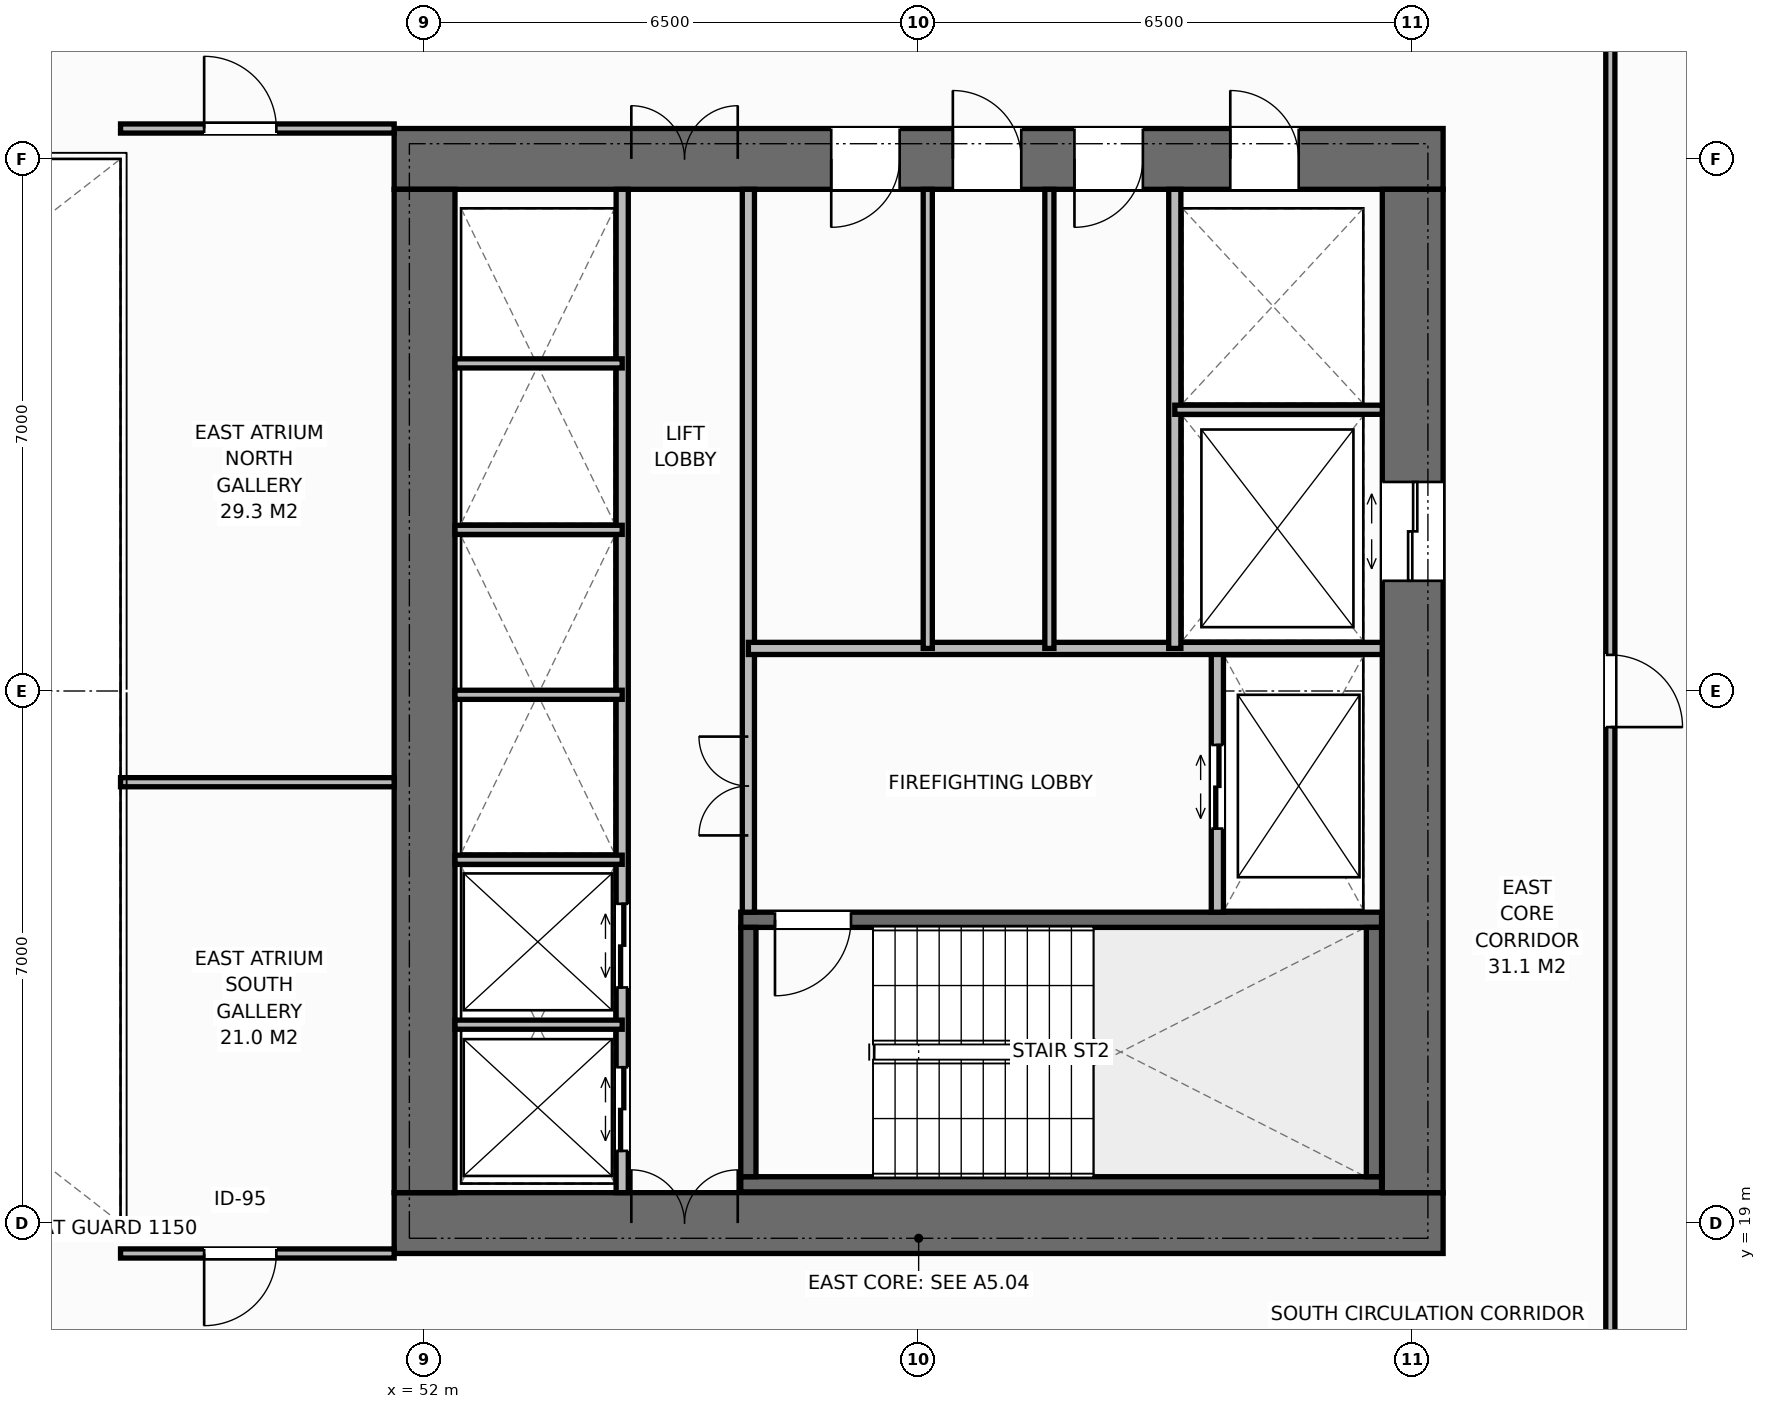
"""IFC4 building model, lengths in metres.
Left out: names, types, materials, properties, quantities, classifications, styles, units other than length and angle.
Written with IfcOpenShell. Run it as: python <this file> out.ifc"""

import sys

from ifc_helpers import new_model, si_unit, direction, frame, frame_2d, origin, place, context, subcontext, project, spatial, rectangle, extrude, element, fill, save


model = new_model("IFC4")
c1 = context("Model", 3, precision=1e-05, world=origin(), true_north=direction((0.0, 1.0)))
c2 = subcontext(c1, "Body", "Model", "MODEL_VIEW")
j1 = project(units=[si_unit("LENGTHUNIT", "METRE"), si_unit("PLANEANGLEUNIT", "RADIAN")], contexts=[c1])
p1 = place(None, origin())
s1 = spatial("IfcSite", under=j1, at=p1, CompositionType="ELEMENT")
p2 = place(p1, origin())
s2 = spatial("IfcBuilding", under=s1, at=p2, CompositionType="ELEMENT")
p3 = place(p2, frame((0.0, 0.0, 43.0)))
s3 = spatial("IfcBuildingStorey", under=s2, at=p3, CompositionType="ELEMENT", Elevation=43.0)
p4 = place(p3, frame((51.6, 19.0, 0.0), z_axis=(0.0, 0.0, 1.0), x_axis=(1.0, 0.0, 0.0)))
e1 = element("IfcWall", 1, at=p4, inside=s3, PredefinedType="SHEAR", context=c2, shape_type="SweptSolid", body=[
    extrude(rectangle(XDim=13.8, YDim=0.8, at=frame_2d((6.9, 0.0))), origin(), (0.0, 0.0, 1.0), 3.8),
])
p5 = place(p4, frame((3.12, 0.0, 0.0)))
e2 = element("IfcOpeningElement", 2, at=p5, cuts=e1, PredefinedType="OPENING", context=c2, shape_type="SweptSolid", body=[
    extrude(rectangle(XDim=1.4, YDim=2.2, at=frame_2d((0.7, 1.1))), frame((0.0, 0.41, 0.0), z_axis=(0.0, -1.0, 0.0), x_axis=(1.0, 0.0, 0.0)), (0.0, 0.0, 1.0), 0.82),
])
p6 = place(p3, frame((51.6, 33.0, 0.0), z_axis=(0.0, 0.0, 1.0), x_axis=(1.0, 0.0, 0.0)))
e3 = element("IfcWall", 3, at=p6, inside=s3, PredefinedType="SHEAR", context=c2, shape_type="SweptSolid", body=[
    extrude(rectangle(XDim=13.8, YDim=0.8, at=frame_2d((6.9, 0.0))), origin(), (0.0, 0.0, 1.0), 3.8),
])
p7 = place(p6, frame((3.12, 0.0, 0.0)))
e4 = element("IfcOpeningElement", 4, at=p7, cuts=e3, PredefinedType="OPENING", context=c2, shape_type="SweptSolid", body=[
    extrude(rectangle(XDim=1.4, YDim=2.2, at=frame_2d((0.7, 1.1))), frame((0.0, 0.41, 0.0), z_axis=(0.0, -1.0, 0.0), x_axis=(1.0, 0.0, 0.0)), (0.0, 0.0, 1.0), 0.82),
])
p8 = place(p6, frame((11.0, 0.0, 0.0)))
e5 = element("IfcOpeningElement", 5, at=p8, cuts=e3, PredefinedType="OPENING", context=c2, shape_type="SweptSolid", body=[
    extrude(rectangle(XDim=0.9, YDim=2.15, at=frame_2d((0.45, 1.075))), frame((0.0, 0.41, 0.0), z_axis=(0.0, -1.0, 0.0), x_axis=(1.0, 0.0, 0.0)), (0.0, 0.0, 1.0), 0.82),
])
p9 = place(p6, frame((5.75, 0.0, 0.0)))
e6 = element("IfcOpeningElement", 6, at=p9, cuts=e3, PredefinedType="OPENING", context=c2, shape_type="SweptSolid", body=[
    extrude(rectangle(XDim=0.9, YDim=2.15, at=frame_2d((0.45, 1.075))), frame((0.0, 0.41, 0.0), z_axis=(0.0, -1.0, 0.0), x_axis=(1.0, 0.0, 0.0)), (0.0, 0.0, 1.0), 0.82),
])
p10 = place(p6, frame((7.35, 0.0, 0.0)))
e7 = element("IfcOpeningElement", 7, at=p10, cuts=e3, PredefinedType="OPENING", context=c2, shape_type="SweptSolid", body=[
    extrude(rectangle(XDim=0.9, YDim=2.15, at=frame_2d((0.45, 1.075))), frame((0.0, 0.41, 0.0), z_axis=(0.0, -1.0, 0.0), x_axis=(1.0, 0.0, 0.0)), (0.0, 0.0, 1.0), 0.82),
])
p11 = place(p6, frame((8.95, 0.0, 0.0)))
e8 = element("IfcOpeningElement", 8, at=p11, cuts=e3, PredefinedType="OPENING", context=c2, shape_type="SweptSolid", body=[
    extrude(rectangle(XDim=0.9, YDim=2.15, at=frame_2d((0.45, 1.075))), frame((0.0, 0.41, 0.0), z_axis=(0.0, -1.0, 0.0), x_axis=(1.0, 0.0, 0.0)), (0.0, 0.0, 1.0), 0.82),
])
p12 = place(p3, frame((52.0, 19.4, 0.0), z_axis=(0.0, 0.0, 1.0), x_axis=(0.0, 1.0, 0.0)))
e9 = element("IfcWall", 9, at=p12, inside=s3, PredefinedType="SHEAR", context=c2, shape_type="SweptSolid", body=[
    extrude(rectangle(XDim=13.2, YDim=0.8, at=frame_2d((6.6, 0.0))), origin(), (0.0, 0.0, 1.0), 3.8),
])
p13 = place(p3, frame((65.0, 19.4, 0.0), z_axis=(0.0, 0.0, 1.0), x_axis=(0.0, 1.0, 0.0)))
e10 = element("IfcWall", 10, at=p13, inside=s3, PredefinedType="SHEAR", context=c2, shape_type="SweptSolid", body=[
    extrude(rectangle(XDim=13.2, YDim=0.8, at=frame_2d((6.6, 0.0))), origin(), (0.0, 0.0, 1.0), 3.8),
])
p14 = place(p13, frame((8.05, 0.0, 0.0)))
e11 = element("IfcOpeningElement", 11, at=p14, cuts=e10, PredefinedType="OPENING", context=c2, shape_type="SweptSolid", body=[
    extrude(rectangle(XDim=1.3, YDim=2.2, at=frame_2d((0.65, 1.1))), frame((0.0, 0.41, 0.0), z_axis=(0.0, -1.0, 0.0), x_axis=(1.0, 0.0, 0.0)), (0.0, 0.0, 1.0), 0.82),
])
p15 = place(p3, frame((56.16, 19.51, 0.0), z_axis=(0.0, 0.0, 1.0), x_axis=(1.0, 0.0, 0.0)))
e12 = element("IfcWall", 12, at=p15, inside=s3, PredefinedType="SHEAR", context=c2, shape_type="SweptSolid", body=[
    extrude(rectangle(XDim=8.43, YDim=0.2, at=frame_2d((4.215, 0.0))), origin(), (0.0, 0.0, 1.0), 3.8),
])
p16 = place(p3, frame((56.16, 22.99, 0.0), z_axis=(0.0, 0.0, 1.0), x_axis=(1.0, 0.0, 0.0)))
e13 = element("IfcWall", 13, at=p16, inside=s3, PredefinedType="SHEAR", context=c2, shape_type="SweptSolid", body=[
    extrude(rectangle(XDim=8.43, YDim=0.2, at=frame_2d((4.215, 0.0))), origin(), (0.0, 0.0, 1.0), 3.8),
])
p17 = place(p16, frame((0.45, 0.0, 0.0)))
e14 = element("IfcOpeningElement", 14, at=p17, cuts=e13, PredefinedType="OPENING", context=c2, shape_type="SweptSolid", body=[
    extrude(rectangle(XDim=1.0, YDim=2.15, at=frame_2d((0.5, 1.075))), frame((0.0, 0.11, 0.0), z_axis=(0.0, -1.0, 0.0), x_axis=(1.0, 0.0, 0.0)), (0.0, 0.0, 1.0), 0.22),
])
for number, where, z_axis, x_axis in (
    (15, (56.26, 19.61, 0.0), (0.0, 0.0, 1.0), (0.0, 1.0, 0.0)),
    (16, (64.49, 19.61, 0.0), (0.0, 0.0, 1.0), (0.0, 1.0, 0.0)),
):
    element("IfcWall", number, at=place(p3, frame(where, z_axis=z_axis, x_axis=x_axis)), inside=s3, PredefinedType="SHEAR", context=c2, shape_type="SweptSolid", body=[
        extrude(rectangle(XDim=3.28, YDim=0.2, at=frame_2d((1.64, 0.0))), origin(), (0.0, 0.0, 1.0), 3.8),
    ])
p18 = place(p3, frame((54.6, 19.4, 0.0), z_axis=(0.0, 0.0, 1.0), x_axis=(0.0, 1.0, 0.0)))
e17 = element("IfcWall", 17, at=p18, inside=s3, PredefinedType="STANDARD", context=c2, shape_type="SweptSolid", body=[
    extrude(rectangle(XDim=13.2, YDim=0.16, at=frame_2d((6.6, 0.0))), origin(), (0.0, 0.0, 1.0), 3.55),
])
p19 = place(p18, frame((0.55, 0.0, 0.0)))
e18 = element("IfcOpeningElement", 18, at=p19, cuts=e17, PredefinedType="OPENING", context=c2, shape_type="SweptSolid", body=[
    extrude(rectangle(XDim=1.1, YDim=2.2, at=frame_2d((0.55, 1.1))), frame((0.0, 0.09, 0.0), z_axis=(0.0, -1.0, 0.0), x_axis=(1.0, 0.0, 0.0)), (0.0, 0.0, 1.0), 0.18),
])
p20 = place(p18, frame((2.7, 0.0, 0.0)))
e19 = element("IfcOpeningElement", 19, at=p20, cuts=e17, PredefinedType="OPENING", context=c2, shape_type="SweptSolid", body=[
    extrude(rectangle(XDim=1.1, YDim=2.2, at=frame_2d((0.55, 1.1))), frame((0.0, 0.09, 0.0), z_axis=(0.0, -1.0, 0.0), x_axis=(1.0, 0.0, 0.0)), (0.0, 0.0, 1.0), 0.18),
])
p21 = place(p3, frame((56.26, 23.09, 0.0), z_axis=(0.0, 0.0, 1.0), x_axis=(0.0, 1.0, 0.0)))
e20 = element("IfcWall", 20, at=p21, inside=s3, PredefinedType="STANDARD", context=c2, shape_type="SweptSolid", body=[
    extrude(rectangle(XDim=9.51, YDim=0.16, at=frame_2d((4.755, 0.0))), origin(), (0.0, 0.0, 1.0), 3.55),
])
p22 = place(p21, frame((1.01, 0.0, 0.0)))
e21 = element("IfcOpeningElement", 21, at=p22, cuts=e20, PredefinedType="OPENING", context=c2, shape_type="SweptSolid", body=[
    extrude(rectangle(XDim=1.3, YDim=2.2, at=frame_2d((0.65, 1.1))), frame((0.0, 0.09, 0.0), z_axis=(0.0, -1.0, 0.0), x_axis=(1.0, 0.0, 0.0)), (0.0, 0.0, 1.0), 0.18),
])
for number, where, z_axis, x_axis in (
    (22, (52.4, 21.61, 0.0), (0.0, 0.0, 1.0), (1.0, 0.0, 0.0)),
    (23, (52.4, 23.78, 0.0), (0.0, 0.0, 1.0), (1.0, 0.0, 0.0)),
    (24, (52.4, 25.95, 0.0), (0.0, 0.0, 1.0), (1.0, 0.0, 0.0)),
    (25, (52.4, 28.12, 0.0), (0.0, 0.0, 1.0), (1.0, 0.0, 0.0)),
    (26, (52.4, 30.31, 0.0), (0.0, 0.0, 1.0), (1.0, 0.0, 0.0)),
):
    element("IfcWall", number, at=place(p3, frame(where, z_axis=z_axis, x_axis=x_axis)), inside=s3, PredefinedType="PARTITIONING", context=c2, shape_type="SweptSolid", body=[
        extrude(rectangle(XDim=2.2, YDim=0.12, at=frame_2d((1.1, 0.0))), origin(), (0.0, 0.0, 1.0), 3.55),
    ])
p23 = place(p3, frame((62.43, 23.09, 0.0), z_axis=(0.0, 0.0, 1.0), x_axis=(0.0, 1.0, 0.0)))
e27 = element("IfcWall", 27, at=p23, inside=s3, PredefinedType="STANDARD", context=c2, shape_type="SweptSolid", body=[
    extrude(rectangle(XDim=3.47, YDim=0.16, at=frame_2d((1.735, 0.0))), origin(), (0.0, 0.0, 1.0), 3.55),
])
p24 = place(p23, frame((1.1, 0.0, 0.0)))
e28 = element("IfcOpeningElement", 28, at=p24, cuts=e27, PredefinedType="OPENING", context=c2, shape_type="SweptSolid", body=[
    extrude(rectangle(XDim=1.1, YDim=2.2, at=frame_2d((0.55, 1.1))), frame((0.0, 0.09, 0.0), z_axis=(0.0, -1.0, 0.0), x_axis=(1.0, 0.0, 0.0)), (0.0, 0.0, 1.0), 0.18),
])
p25 = place(p3, frame((56.26, 26.56, 0.0), z_axis=(0.0, 0.0, 1.0), x_axis=(1.0, 0.0, 0.0)))
e29 = element("IfcWall", 29, at=p25, inside=s3, PredefinedType="STANDARD", context=c2, shape_type="SweptSolid", body=[
    extrude(rectangle(XDim=8.34, YDim=0.16, at=frame_2d((4.17, 0.0))), origin(), (0.0, 0.0, 1.0), 3.55),
])
p26 = place(p3, frame((61.87, 26.56, 0.0), z_axis=(0.0, 0.0, 1.0), x_axis=(0.0, 1.0, 0.0)))
e30 = element("IfcWall", 30, at=p26, inside=s3, PredefinedType="STANDARD", context=c2, shape_type="SweptSolid", body=[
    extrude(rectangle(XDim=6.04, YDim=0.16, at=frame_2d((3.02, 0.0))), origin(), (0.0, 0.0, 1.0), 3.55),
])
p27 = place(p3, frame((61.87, 29.7, 0.0), z_axis=(0.0, 0.0, 1.0), x_axis=(1.0, 0.0, 0.0)))
e31 = element("IfcWall", 31, at=p27, inside=s3, PredefinedType="PARTITIONING", context=c2, shape_type="SweptSolid", body=[
    extrude(rectangle(XDim=2.73, YDim=0.12, at=frame_2d((1.365, 0.0))), origin(), (0.0, 0.0, 1.0), 3.55),
])
for number, where, z_axis, x_axis in (
    (32, (58.62, 26.56, 0.0), (0.0, 0.0, 1.0), (0.0, 1.0, 0.0)),
    (33, (60.22, 26.56, 0.0), (0.0, 0.0, 1.0), (0.0, 1.0, 0.0)),
):
    element("IfcWall", number, at=place(p3, frame(where, z_axis=z_axis, x_axis=x_axis)), inside=s3, PredefinedType="PARTITIONING", context=c2, shape_type="SweptSolid", body=[
        extrude(rectangle(XDim=6.04, YDim=0.12, at=frame_2d((3.02, 0.0))), origin(), (0.0, 0.0, 1.0), 3.55),
    ])
p28 = place(p3, frame((48.0, 24.8, 0.0), z_axis=(0.0, 0.0, 1.0), x_axis=(1.0, 0.0, 0.0)))
e34 = element("IfcWall", 34, at=p28, inside=s3, PredefinedType="PARTITIONING", context=c2, shape_type="SweptSolid", body=[
    extrude(rectangle(XDim=3.6, YDim=0.12, at=frame_2d((1.8, 0.0))), origin(), (0.0, 0.0, 1.0), 3.55),
])
p29 = place(p3, frame((48.0, 18.6, 0.0), z_axis=(0.0, 0.0, 1.0), x_axis=(1.0, 0.0, 0.0)))
e35 = element("IfcWall", 35, at=p29, inside=s3, PredefinedType="PARTITIONING", context=c2, shape_type="SweptSolid", body=[
    extrude(rectangle(XDim=3.6, YDim=0.12, at=frame_2d((1.8, 0.0))), origin(), (0.0, 0.0, 1.0), 3.55),
])
p30 = place(p29, frame((1.1, 0.0, 0.0)))
e36 = element("IfcOpeningElement", 36, at=p30, cuts=e35, PredefinedType="OPENING", context=c2, shape_type="SweptSolid", body=[
    extrude(rectangle(XDim=0.95, YDim=2.15, at=frame_2d((0.475, 1.075))), frame((0.0, 0.07, 0.0), z_axis=(0.0, -1.0, 0.0), x_axis=(1.0, 0.0, 0.0)), (0.0, 0.0, 1.0), 0.14),
])
p31 = place(p3, frame((48.0, 33.4, 0.0), z_axis=(0.0, 0.0, 1.0), x_axis=(1.0, 0.0, 0.0)))
e37 = element("IfcWall", 37, at=p31, inside=s3, PredefinedType="PARTITIONING", context=c2, shape_type="SweptSolid", body=[
    extrude(rectangle(XDim=3.6, YDim=0.12, at=frame_2d((1.8, 0.0))), origin(), (0.0, 0.0, 1.0), 3.55),
])
p32 = place(p31, frame((1.1, 0.0, 0.0)))
e38 = element("IfcOpeningElement", 38, at=p32, cuts=e37, PredefinedType="OPENING", context=c2, shape_type="SweptSolid", body=[
    extrude(rectangle(XDim=0.95, YDim=2.15, at=frame_2d((0.475, 1.075))), frame((0.0, 0.07, 0.0), z_axis=(0.0, -1.0, 0.0), x_axis=(1.0, 0.0, 0.0)), (0.0, 0.0, 1.0), 0.14),
])
p33 = place(p3, frame((67.6, 16.5, 0.0), z_axis=(0.0, 0.0, 1.0), x_axis=(0.0, 1.0, 0.0)))
e39 = element("IfcWall", 39, at=p33, inside=s3, PredefinedType="PARTITIONING", context=c2, shape_type="SweptSolid", body=[
    extrude(rectangle(XDim=19.0, YDim=0.12, at=frame_2d((9.5, 0.0))), origin(), (0.0, 0.0, 1.0), 3.55),
])
p34 = place(p33, frame((9.025, 0.0, 0.0)))
e40 = element("IfcOpeningElement", 40, at=p34, cuts=e39, PredefinedType="OPENING", context=c2, shape_type="SweptSolid", body=[
    extrude(rectangle(XDim=0.95, YDim=2.15, at=frame_2d((0.475, 1.075))), frame((0.0, 0.07, 0.0), z_axis=(0.0, -1.0, 0.0), x_axis=(1.0, 0.0, 0.0)), (0.0, 0.0, 1.0), 0.14),
])
p35 = place(p5, origin())
e41 = element("IfcDoor", 41, at=p35, inside=s3, OperationType="DOUBLE_DOOR_SINGLE_SWING", PredefinedType="DOOR", context=c2, shape_type="SweptSolid", body=[
    extrude(rectangle(XDim=1.4, YDim=2.2, at=frame_2d((0.7, 1.1))), frame((0.0, 0.125, 0.0), z_axis=(0.0, -1.0, 0.0), x_axis=(1.0, 0.0, 0.0)), (0.0, 0.0, 1.0), 0.05),
])
fill(e2, e41)
p36 = place(p7, origin())
e42 = element("IfcDoor", 42, at=p36, inside=s3, OperationType="DOUBLE_DOOR_SINGLE_SWING", PredefinedType="DOOR", context=c2, shape_type="SweptSolid", body=[
    extrude(rectangle(XDim=1.4, YDim=2.2, at=frame_2d((0.7, 1.1))), frame((0.0, -0.075, 0.0), z_axis=(0.0, -1.0, 0.0), x_axis=(1.0, 0.0, 0.0)), (0.0, 0.0, 1.0), 0.05),
])
fill(e4, e42)
p37 = place(p19, origin())
e43 = element("IfcDoor", 43, at=p37, inside=s3, OperationType="DOUBLE_DOOR_SLIDING", PredefinedType="DOOR", context=c2, shape_type="SweptSolid", body=[
    extrude(rectangle(XDim=1.1, YDim=2.2, at=frame_2d((0.55, 1.1))), frame((0.0, 0.025, 0.0), z_axis=(0.0, -1.0, 0.0), x_axis=(1.0, 0.0, 0.0)), (0.0, 0.0, 1.0), 0.05),
])
fill(e18, e43)
p38 = place(p20, origin())
e44 = element("IfcDoor", 44, at=p38, inside=s3, OperationType="DOUBLE_DOOR_SLIDING", PredefinedType="DOOR", context=c2, shape_type="SweptSolid", body=[
    extrude(rectangle(XDim=1.1, YDim=2.2, at=frame_2d((0.55, 1.1))), frame((0.0, 0.025, 0.0), z_axis=(0.0, -1.0, 0.0), x_axis=(1.0, 0.0, 0.0)), (0.0, 0.0, 1.0), 0.05),
])
fill(e19, e44)
p39 = place(p17, origin())
e45 = element("IfcDoor", 45, at=p39, inside=s3, OperationType="SINGLE_SWING_RIGHT", PredefinedType="DOOR", context=c2, shape_type="SweptSolid", body=[
    extrude(rectangle(XDim=1.0, YDim=2.15, at=frame_2d((0.5, 1.075))), frame((0.0, 0.025, 0.0), z_axis=(0.0, -1.0, 0.0), x_axis=(1.0, 0.0, 0.0)), (0.0, 0.0, 1.0), 0.05),
])
fill(e14, e45)
p40 = place(p24, origin())
e46 = element("IfcDoor", 46, at=p40, inside=s3, OperationType="DOUBLE_DOOR_SLIDING", PredefinedType="DOOR", context=c2, shape_type="SweptSolid", body=[
    extrude(rectangle(XDim=1.1, YDim=2.2, at=frame_2d((0.55, 1.1))), frame((0.0, 0.025, 0.0), z_axis=(0.0, -1.0, 0.0), x_axis=(1.0, 0.0, 0.0)), (0.0, 0.0, 1.0), 0.05),
])
fill(e28, e46)
p41 = place(p22, origin())
e47 = element("IfcDoor", 47, at=p41, inside=s3, OperationType="DOUBLE_DOOR_SINGLE_SWING", PredefinedType="DOOR", context=c2, shape_type="SweptSolid", body=[
    extrude(rectangle(XDim=1.3, YDim=2.2, at=frame_2d((0.65, 1.1))), frame((0.0, 0.025, 0.0), z_axis=(0.0, -1.0, 0.0), x_axis=(1.0, 0.0, 0.0)), (0.0, 0.0, 1.0), 0.05),
])
fill(e21, e47)
p42 = place(p14, origin())
e48 = element("IfcDoor", 48, at=p42, inside=s3, OperationType="DOUBLE_DOOR_SLIDING", PredefinedType="DOOR", context=c2, shape_type="SweptSolid", body=[
    extrude(rectangle(XDim=1.3, YDim=2.2, at=frame_2d((0.65, 1.1))), frame((0.0, 0.025, 0.0), z_axis=(0.0, -1.0, 0.0), x_axis=(1.0, 0.0, 0.0)), (0.0, 0.0, 1.0), 0.05),
])
fill(e11, e48)
p43 = place(p8, origin())
e49 = element("IfcDoor", 49, at=p43, inside=s3, OperationType="SINGLE_SWING_LEFT", PredefinedType="DOOR", context=c2, shape_type="SweptSolid", body=[
    extrude(rectangle(XDim=0.9, YDim=2.15, at=frame_2d((0.45, 1.075))), frame((0.0, -0.075, 0.0), z_axis=(0.0, -1.0, 0.0), x_axis=(1.0, 0.0, 0.0)), (0.0, 0.0, 1.0), 0.05),
])
fill(e5, e49)
p44 = place(p9, origin())
e50 = element("IfcDoor", 50, at=p44, inside=s3, OperationType="SINGLE_SWING_RIGHT", PredefinedType="DOOR", context=c2, shape_type="SweptSolid", body=[
    extrude(rectangle(XDim=0.9, YDim=2.15, at=frame_2d((0.45, 1.075))), frame((0.0, -0.075, 0.0), z_axis=(0.0, -1.0, 0.0), x_axis=(1.0, 0.0, 0.0)), (0.0, 0.0, 1.0), 0.05),
])
fill(e6, e50)
p45 = place(p10, origin())
e51 = element("IfcDoor", 51, at=p45, inside=s3, OperationType="SINGLE_SWING_LEFT", PredefinedType="DOOR", context=c2, shape_type="SweptSolid", body=[
    extrude(rectangle(XDim=0.9, YDim=2.15, at=frame_2d((0.45, 1.075))), frame((0.0, -0.075, 0.0), z_axis=(0.0, -1.0, 0.0), x_axis=(1.0, 0.0, 0.0)), (0.0, 0.0, 1.0), 0.05),
])
fill(e7, e51)
p46 = place(p11, origin())
e52 = element("IfcDoor", 52, at=p46, inside=s3, OperationType="SINGLE_SWING_RIGHT", PredefinedType="DOOR", context=c2, shape_type="SweptSolid", body=[
    extrude(rectangle(XDim=0.9, YDim=2.15, at=frame_2d((0.45, 1.075))), frame((0.0, -0.075, 0.0), z_axis=(0.0, -1.0, 0.0), x_axis=(1.0, 0.0, 0.0)), (0.0, 0.0, 1.0), 0.05),
])
fill(e8, e52)
p47 = place(p30, origin())
e53 = element("IfcDoor", 53, at=p47, inside=s3, OperationType="SINGLE_SWING_RIGHT", PredefinedType="DOOR", context=c2, shape_type="SweptSolid", body=[
    extrude(rectangle(XDim=0.95, YDim=2.15, at=frame_2d((0.475, 1.075))), frame((0.0, 0.025, 0.0), z_axis=(0.0, -1.0, 0.0), x_axis=(1.0, 0.0, 0.0)), (0.0, 0.0, 1.0), 0.05),
])
fill(e36, e53)
p48 = place(p32, origin())
e54 = element("IfcDoor", 54, at=p48, inside=s3, OperationType="SINGLE_SWING_LEFT", PredefinedType="DOOR", context=c2, shape_type="SweptSolid", body=[
    extrude(rectangle(XDim=0.95, YDim=2.15, at=frame_2d((0.475, 1.075))), frame((0.0, 0.025, 0.0), z_axis=(0.0, -1.0, 0.0), x_axis=(1.0, 0.0, 0.0)), (0.0, 0.0, 1.0), 0.05),
])
fill(e38, e54)
p49 = place(p34, origin())
e55 = element("IfcDoor", 55, at=p49, inside=s3, OperationType="SINGLE_SWING_RIGHT", PredefinedType="DOOR", context=c2, shape_type="SweptSolid", body=[
    extrude(rectangle(XDim=0.95, YDim=2.15, at=frame_2d((0.475, 1.075))), frame((0.0, 0.025, 0.0), z_axis=(0.0, -1.0, 0.0), x_axis=(1.0, 0.0, 0.0)), (0.0, 0.0, 1.0), 0.05),
])
fill(e40, e55)
save(model, sys.argv[1])
